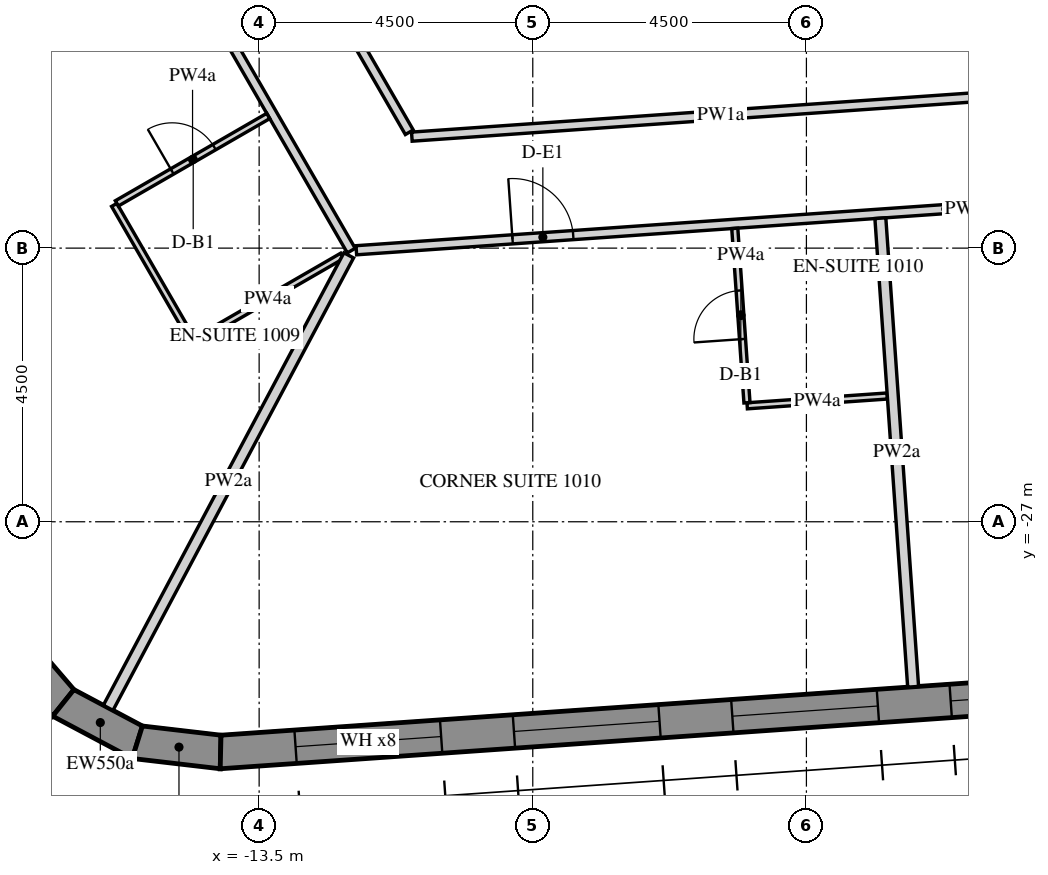
"""IFC4 building model, lengths in metres.
Left out: names, types, materials, properties, quantities, classifications, styles, units other than length and angle.
Written with IfcOpenShell. Run it as: python <this file> out.ifc"""

import sys

from ifc_helpers import new_model, si_unit, direction, frame, frame_2d, origin, place, context, subcontext, project, spatial, polyline, rectangle, outline, extrude, element, fill, save


model = new_model("IFC4")
c1 = context("Model", 3, precision=1e-05, world=origin(), true_north=direction((0.0, 1.0)))
c2 = subcontext(c1, "Body", "Model", "MODEL_VIEW")
j1 = project(units=[si_unit("LENGTHUNIT", "METRE"), si_unit("PLANEANGLEUNIT", "RADIAN")], contexts=[c1])
p1 = place(None, origin())
s1 = spatial("IfcSite", under=j1, at=p1, CompositionType="ELEMENT")
p2 = place(p1, origin())
s2 = spatial("IfcBuilding", under=s1, at=p2, CompositionType="ELEMENT")
p3 = place(p2, frame((0.0, 0.0, 142.8)))
s3 = spatial("IfcBuildingStorey", under=s2, at=p3, CompositionType="ELEMENT", Elevation=142.8)
p4 = place(p3, frame((-17.619, -28.932, -0.15), z_axis=(0.0, 0.0, 1.0), x_axis=(0.651621950847, -0.758543890078, 0.0)))
e1 = element("IfcWall", 1, at=p4, inside=s3, PredefinedType="SOLIDWALL", context=c2, shape_type="SweptSolid", body=[
    extrude(outline(polyline([(-0.026, -0.275), (1.431, -0.275), (1.327, 0.275), (0.026, 0.275), (-0.026, -0.275)])), origin(), (0.0, 0.0, 1.0), 3.75),
])
p5 = place(p3, frame((-16.721, -29.979, -0.15), z_axis=(0.0, 0.0, 1.0), x_axis=(0.882994189209, -0.469383917304, 0.0)))
e2 = element("IfcWall", 2, at=p5, inside=s3, PredefinedType="SOLIDWALL", context=c2, shape_type="SweptSolid", body=[
    extrude(outline(polyline([(-0.052, -0.275), (1.431, -0.275), (1.327, 0.275), (0.052, 0.275), (-0.052, -0.275)])), origin(), (0.0, 0.0, 1.0), 3.75),
])
p6 = place(p3, frame((-15.503, -30.626, -0.15), z_axis=(0.0, 0.0, 1.0), x_axis=(0.993232537394, -0.11614269956, 0.0)))
e3 = element("IfcWall", 3, at=p6, inside=s3, PredefinedType="SOLIDWALL", context=c2, shape_type="SweptSolid", body=[
    extrude(outline(polyline([(-0.052, -0.275), (1.405, -0.275), (1.353, 0.275), (0.052, 0.275), (-0.052, -0.275)])), origin(), (0.0, 0.0, 1.0), 3.75),
])
p7 = place(p3, frame((-14.134, -30.786, -0.15), z_axis=(0.0, 0.0, 1.0), x_axis=(0.997564037441, 0.069756657061, 0.0)))
e4 = element("IfcWall", 4, at=p7, inside=s3, PredefinedType="SOLIDWALL", context=c2, shape_type="SweptSolid", body=[
    extrude(outline(polyline([(-0.026, -0.275), (30.094, -0.275), (30.049, 0.275), (0.026, 0.275), (-0.026, -0.275)])), origin(), (0.0, 0.0, 1.0), 3.75),
])
p8 = place(p7, frame((1.236, 0.0, 1.05)))
e5 = element("IfcOpeningElement", 5, at=p8, cuts=e4, PredefinedType="OPENING", context=c2, shape_type="SweptSolid", body=[
    extrude(rectangle(XDim=2.4, YDim=2.4, at=frame_2d((1.2, 1.2))), frame((0.0, 0.285, 0.0), z_axis=(0.0, -1.0, 0.0), x_axis=(1.0, 0.0, 0.0)), (0.0, 0.0, 1.0), 0.57),
])
p9 = place(p7, frame((4.835, 0.0, 1.05)))
e6 = element("IfcOpeningElement", 6, at=p9, cuts=e4, PredefinedType="OPENING", context=c2, shape_type="SweptSolid", body=[
    extrude(rectangle(XDim=2.4, YDim=2.4, at=frame_2d((1.2, 1.2))), frame((0.0, 0.285, 0.0), z_axis=(0.0, -1.0, 0.0), x_axis=(1.0, 0.0, 0.0)), (0.0, 0.0, 1.0), 0.57),
])
p10 = place(p7, frame((8.436, 0.0, 1.05)))
e7 = element("IfcOpeningElement", 7, at=p10, cuts=e4, PredefinedType="OPENING", context=c2, shape_type="SweptSolid", body=[
    extrude(rectangle(XDim=2.4, YDim=2.4, at=frame_2d((1.2, 1.2))), frame((0.0, 0.285, 0.0), z_axis=(0.0, -1.0, 0.0), x_axis=(1.0, 0.0, 0.0)), (0.0, 0.0, 1.0), 0.57),
])
p11 = place(p7, frame((12.035, 0.0, 1.05)))
e8 = element("IfcOpeningElement", 8, at=p11, cuts=e4, PredefinedType="OPENING", context=c2, shape_type="SweptSolid", body=[
    extrude(rectangle(XDim=2.4, YDim=2.4, at=frame_2d((1.2, 1.2))), frame((0.0, 0.285, 0.0), z_axis=(0.0, -1.0, 0.0), x_axis=(1.0, 0.0, 0.0)), (0.0, 0.0, 1.0), 0.57),
])
p12 = place(p7, frame((15.635, 0.0, 1.05)))
e9 = element("IfcOpeningElement", 9, at=p12, cuts=e4, PredefinedType="OPENING", context=c2, shape_type="SweptSolid", body=[
    extrude(rectangle(XDim=2.4, YDim=2.4, at=frame_2d((1.2, 1.2))), frame((0.0, 0.285, 0.0), z_axis=(0.0, -1.0, 0.0), x_axis=(1.0, 0.0, 0.0)), (0.0, 0.0, 1.0), 0.57),
])
p13 = place(p7, frame((19.236, 0.0, 1.05)))
e10 = element("IfcOpeningElement", 10, at=p13, cuts=e4, PredefinedType="OPENING", context=c2, shape_type="SweptSolid", body=[
    extrude(rectangle(XDim=2.4, YDim=2.4, at=frame_2d((1.2, 1.2))), frame((0.0, 0.285, 0.0), z_axis=(0.0, -1.0, 0.0), x_axis=(1.0, 0.0, 0.0)), (0.0, 0.0, 1.0), 0.57),
])
p14 = place(p7, frame((22.835, 0.0, 1.05)))
e11 = element("IfcOpeningElement", 11, at=p14, cuts=e4, PredefinedType="OPENING", context=c2, shape_type="SweptSolid", body=[
    extrude(rectangle(XDim=2.4, YDim=2.4, at=frame_2d((1.2, 1.2))), frame((0.0, 0.285, 0.0), z_axis=(0.0, -1.0, 0.0), x_axis=(1.0, 0.0, 0.0)), (0.0, 0.0, 1.0), 0.57),
])
p15 = place(p7, frame((26.436, 0.0, 1.05)))
e12 = element("IfcOpeningElement", 12, at=p15, cuts=e4, PredefinedType="OPENING", context=c2, shape_type="SweptSolid", body=[
    extrude(rectangle(XDim=2.4, YDim=2.4, at=frame_2d((1.2, 1.2))), frame((0.0, 0.285, 0.0), z_axis=(0.0, -1.0, 0.0), x_axis=(1.0, 0.0, 0.0)), (0.0, 0.0, 1.0), 0.57),
])
p16 = place(p3, frame((-23.743, -2.175, 0.0), z_axis=(0.0, 0.0, 1.0), x_axis=(0.499992353047, -0.86602981871, 0.0)))
e13 = element("IfcWall", 13, at=p16, inside=s3, PredefinedType="PARTITIONING", context=c2, shape_type="SweptSolid", body=[
    extrude(rectangle(XDim=23.516, YDim=0.15, at=frame_2d((11.758, 0.0))), origin(), (0.0, 0.0, 1.0), 2.838),
])
p17 = place(p16, frame((10.099, 0.0, 0.0)))
e14 = element("IfcOpeningElement", 14, at=p17, cuts=e13, PredefinedType="OPENING", context=c2, shape_type="SweptSolid", body=[
    extrude(rectangle(XDim=1.0, YDim=2.1, at=frame_2d((0.5, 1.05))), frame((0.0, 0.085, 0.0), z_axis=(0.0, -1.0, 0.0), x_axis=(1.0, 0.0, 0.0)), (0.0, 0.0, 1.0), 0.17),
])
p18 = place(p16, frame((17.358, 0.0, 0.0)))
e15 = element("IfcOpeningElement", 15, at=p18, cuts=e13, PredefinedType="OPENING", context=c2, shape_type="SweptSolid", body=[
    extrude(rectangle(XDim=1.0, YDim=2.1, at=frame_2d((0.5, 1.05))), frame((0.0, 0.085, 0.0), z_axis=(0.0, -1.0, 0.0), x_axis=(1.0, 0.0, 0.0)), (0.0, 0.0, 1.0), 0.17),
])
p19 = place(p3, frame((-11.902, -22.535, 0.0), z_axis=(0.0, 0.0, 1.0), x_axis=(0.997563830208, 0.069759620556, 0.0)))
e16 = element("IfcWall", 16, at=p19, inside=s3, PredefinedType="PARTITIONING", context=c2, shape_type="SweptSolid", body=[
    extrude(rectangle(XDim=19.434, YDim=0.15, at=frame_2d((9.717, 0.0))), origin(), (0.0, 0.0, 1.0), 2.838),
])
p20 = place(p19, frame((2.575, 0.0, 0.0)))
e17 = element("IfcOpeningElement", 17, at=p20, cuts=e16, PredefinedType="OPENING", context=c2, shape_type="SweptSolid", body=[
    extrude(rectangle(XDim=1.0, YDim=2.1, at=frame_2d((0.5, 1.05))), frame((0.0, 0.085, 0.0), z_axis=(0.0, -1.0, 0.0), x_axis=(1.0, 0.0, 0.0)), (0.0, 0.0, 1.0), 0.17),
])
p21 = place(p19, frame((12.234, 0.0, 0.0)))
e18 = element("IfcOpeningElement", 18, at=p21, cuts=e16, PredefinedType="OPENING", context=c2, shape_type="SweptSolid", body=[
    extrude(rectangle(XDim=1.0, YDim=2.1, at=frame_2d((0.5, 1.05))), frame((0.0, 0.085, 0.0), z_axis=(0.0, -1.0, 0.0), x_axis=(1.0, 0.0, 0.0)), (0.0, 0.0, 1.0), 0.17),
])
p22 = place(p3, frame((-0.825, -19.956, 0.0), z_axis=(0.0, 0.0, 1.0), x_axis=(-0.997562587881, -0.069777383582, 0.0)))
e19 = element("IfcWall", 19, at=p22, inside=s3, PredefinedType="PARTITIONING", context=c2, shape_type="SweptSolid", body=[
    extrude(rectangle(XDim=10.189, YDim=0.15, at=frame_2d((5.094, 0.0))), origin(), (0.0, 0.0, 1.0), 2.838),
])
p23 = place(p3, frame((-11.031, -20.595, 0.0), z_axis=(0.0, 0.0, 1.0), x_axis=(-0.499987422378, 0.866032665356, 0.0)))
e20 = element("IfcWall", 20, at=p23, inside=s3, PredefinedType="PARTITIONING", context=c2, shape_type="SweptSolid", body=[
    extrude(rectangle(XDim=11.299, YDim=0.15, at=frame_2d((5.649, 0.0))), origin(), (0.0, 0.0, 1.0), 2.838),
])
p24 = place(p23, frame((5.199, 0.0, 0.0)))
e21 = element("IfcOpeningElement", 21, at=p24, cuts=e20, PredefinedType="OPENING", context=c2, shape_type="SweptSolid", body=[
    extrude(rectangle(XDim=0.9, YDim=2.1, at=frame_2d((0.45, 1.05))), frame((0.0, 0.085, 0.0), z_axis=(0.0, -1.0, 0.0), x_axis=(1.0, 0.0, 0.0)), (0.0, 0.0, 1.0), 0.17),
])
p25 = place(p3, frame((-12.133, -22.626, 0.0), z_axis=(0.0, 0.0, 1.0), x_axis=(-0.866014564827, -0.500018773155, 0.0)))
e22 = element("IfcWall", 22, at=p25, inside=s3, PredefinedType="PARTITIONING", context=c2, shape_type="SweptSolid", body=[
    extrude(rectangle(XDim=2.829, YDim=0.1, at=frame_2d((1.415, 0.0))), origin(), (0.0, 0.0, 1.0), 2.838),
])
p26 = place(p3, frame((-14.608, -23.998, 0.0), z_axis=(0.0, 0.0, 1.0), x_axis=(-0.499990435942, 0.866030925526, 0.0)))
e23 = element("IfcWall", 23, at=p26, inside=s3, PredefinedType="PARTITIONING", context=c2, shape_type="SweptSolid", body=[
    extrude(rectangle(XDim=2.55, YDim=0.1, at=frame_2d((1.275, 0.0))), origin(), (0.0, 0.0, 1.0), 2.838),
])
p27 = place(p3, frame((-15.84, -21.764, 0.0), z_axis=(0.0, 0.0, 1.0), x_axis=(0.866039941686, 0.499974818771, 0.0)))
e24 = element("IfcWall", 24, at=p27, inside=s3, PredefinedType="PARTITIONING", context=c2, shape_type="SweptSolid", body=[
    extrude(rectangle(XDim=2.875, YDim=0.1, at=frame_2d((1.438, 0.0))), origin(), (0.0, 0.0, 1.0), 2.838),
])
p28 = place(p27, frame((1.05, 0.0, 0.0)))
e25 = element("IfcOpeningElement", 25, at=p28, cuts=e24, PredefinedType="OPENING", context=c2, shape_type="SweptSolid", body=[
    extrude(rectangle(XDim=0.8, YDim=2.1, at=frame_2d((0.4, 1.05))), frame((0.0, 0.06, 0.0), z_axis=(0.0, -1.0, 0.0), x_axis=(1.0, 0.0, 0.0)), (0.0, 0.0, 1.0), 0.12),
])
p29 = place(p3, frame((-15.983, -30.059, 0.0), z_axis=(0.0, 0.0, 1.0), x_axis=(0.469475065364, 0.882945730496, 0.0)))
e26 = element("IfcWall", 26, at=p29, inside=s3, PredefinedType="PARTITIONING", context=c2, shape_type="SweptSolid", body=[
    extrude(rectangle(XDim=8.427, YDim=0.18, at=frame_2d((4.213, 0.0))), origin(), (0.0, 0.0, 1.0), 2.838),
])
p30 = place(p3, frame((-3.17, -24.932, 0.0), z_axis=(0.0, 0.0, 1.0), x_axis=(-0.997564338377, -0.069752353356, 0.0)))
e27 = element("IfcWall", 27, at=p30, inside=s3, PredefinedType="PARTITIONING", context=c2, shape_type="SweptSolid", body=[
    extrude(rectangle(XDim=2.31, YDim=0.1, at=frame_2d((1.155, 0.0))), origin(), (0.0, 0.0, 1.0), 2.838),
])
p31 = place(p3, frame((-5.478, -25.043, 0.0), z_axis=(0.0, 0.0, 1.0), x_axis=(-0.069714207611, 0.997567004896, 0.0)))
e28 = element("IfcWall", 28, at=p31, inside=s3, PredefinedType="PARTITIONING", context=c2, shape_type="SweptSolid", body=[
    extrude(rectangle(XDim=2.875, YDim=0.1, at=frame_2d((1.438, 0.0))), origin(), (0.0, 0.0, 1.0), 2.838),
])
p32 = place(p31, frame((1.05, 0.0, 0.0)))
e29 = element("IfcOpeningElement", 29, at=p32, cuts=e28, PredefinedType="OPENING", context=c2, shape_type="SweptSolid", body=[
    extrude(rectangle(XDim=0.8, YDim=2.1, at=frame_2d((0.4, 1.05))), frame((0.0, 0.06, 0.0), z_axis=(0.0, -1.0, 0.0), x_axis=(1.0, 0.0, 0.0)), (0.0, 0.0, 1.0), 0.12),
])
p33 = place(p3, frame((-2.745, -29.714, 0.0), z_axis=(0.0, 0.0, 1.0), x_axis=(-0.069748931501, 0.997564577636, 0.0)))
e30 = element("IfcWall", 30, at=p33, inside=s3, PredefinedType="PARTITIONING", context=c2, shape_type="SweptSolid", body=[
    extrude(rectangle(XDim=7.725, YDim=0.18, at=frame_2d((3.863, 0.0))), origin(), (0.0, 0.0, 1.0), 2.838),
])
p34 = place(p8, frame((0.0, 0.205, 0.0)))
e31 = element("IfcWindow", 31, at=p34, inside=s3, PartitioningType="DOUBLE_PANEL_VERTICAL", PredefinedType="WINDOW", context=c2, shape_type="SweptSolid", body=[
    extrude(rectangle(XDim=2.4, YDim=2.4, at=frame_2d((1.2, 1.2))), frame((0.0, 0.03, 0.0), z_axis=(0.0, -1.0, 0.0), x_axis=(1.0, 0.0, 0.0)), (0.0, 0.0, 1.0), 0.06),
])
fill(e5, e31)
p35 = place(p9, frame((0.0, 0.205, 0.0)))
e32 = element("IfcWindow", 32, at=p35, inside=s3, PartitioningType="DOUBLE_PANEL_VERTICAL", PredefinedType="WINDOW", context=c2, shape_type="SweptSolid", body=[
    extrude(rectangle(XDim=2.4, YDim=2.4, at=frame_2d((1.2, 1.2))), frame((0.0, 0.03, 0.0), z_axis=(0.0, -1.0, 0.0), x_axis=(1.0, 0.0, 0.0)), (0.0, 0.0, 1.0), 0.06),
])
fill(e6, e32)
p36 = place(p10, frame((0.0, 0.205, 0.0)))
e33 = element("IfcWindow", 33, at=p36, inside=s3, PartitioningType="DOUBLE_PANEL_VERTICAL", PredefinedType="WINDOW", context=c2, shape_type="SweptSolid", body=[
    extrude(rectangle(XDim=2.4, YDim=2.4, at=frame_2d((1.2, 1.2))), frame((0.0, 0.03, 0.0), z_axis=(0.0, -1.0, 0.0), x_axis=(1.0, 0.0, 0.0)), (0.0, 0.0, 1.0), 0.06),
])
fill(e7, e33)
p37 = place(p11, frame((0.0, 0.205, 0.0)))
e34 = element("IfcWindow", 34, at=p37, inside=s3, PartitioningType="DOUBLE_PANEL_VERTICAL", PredefinedType="WINDOW", context=c2, shape_type="SweptSolid", body=[
    extrude(rectangle(XDim=2.4, YDim=2.4, at=frame_2d((1.2, 1.2))), frame((0.0, 0.03, 0.0), z_axis=(0.0, -1.0, 0.0), x_axis=(1.0, 0.0, 0.0)), (0.0, 0.0, 1.0), 0.06),
])
fill(e8, e34)
p38 = place(p28, origin())
e35 = element("IfcDoor", 35, at=p38, inside=s3, OperationType="SINGLE_SWING_LEFT", PredefinedType="DOOR", context=c2, shape_type="SweptSolid", body=[
    extrude(rectangle(XDim=0.8, YDim=2.1, at=frame_2d((0.4, 1.05))), frame((0.0, 0.025, 0.0), z_axis=(0.0, -1.0, 0.0), x_axis=(1.0, 0.0, 0.0)), (0.0, 0.0, 1.0), 0.05),
])
fill(e25, e35)
p39 = place(p20, origin())
e36 = element("IfcDoor", 36, at=p39, inside=s3, OperationType="SINGLE_SWING_RIGHT", PredefinedType="DOOR", context=c2, shape_type="SweptSolid", body=[
    extrude(rectangle(XDim=1.0, YDim=2.1, at=frame_2d((0.5, 1.05))), frame((0.0, 0.025, 0.0), z_axis=(0.0, -1.0, 0.0), x_axis=(1.0, 0.0, 0.0)), (0.0, 0.0, 1.0), 0.05),
])
fill(e17, e36)
p40 = place(p32, origin())
e37 = element("IfcDoor", 37, at=p40, inside=s3, OperationType="SINGLE_SWING_LEFT", PredefinedType="DOOR", context=c2, shape_type="SweptSolid", body=[
    extrude(rectangle(XDim=0.8, YDim=2.1, at=frame_2d((0.4, 1.05))), frame((0.0, 0.025, 0.0), z_axis=(0.0, -1.0, 0.0), x_axis=(1.0, 0.0, 0.0)), (0.0, 0.0, 1.0), 0.05),
])
fill(e29, e37)
save(model, sys.argv[1])
